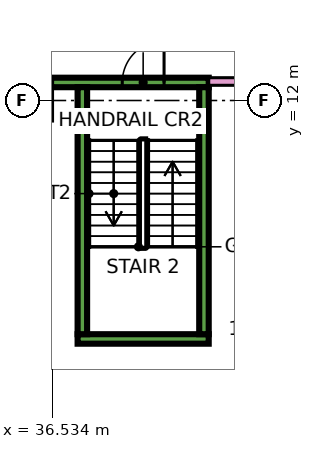
"""IFC4 building model, lengths in metres.
Left out: names, types, materials, properties, quantities, classifications, styles, units other than length and angle.
Written with IfcOpenShell. Run it as: python <this file> out.ifc"""

import sys

from ifc_helpers import new_model, si_unit, direction, frame, frame_2d, origin, place, context, subcontext, project, spatial, rectangle, extrude, element, fill, save


model = new_model("IFC4")
c1 = context("Model", 3, precision=1e-05, world=origin(), true_north=direction((0.0, 1.0)))
c2 = subcontext(c1, "Body", "Model", "MODEL_VIEW")
j1 = project(units=[si_unit("LENGTHUNIT", "METRE"), si_unit("PLANEANGLEUNIT", "RADIAN")], contexts=[c1])
p1 = place(None, origin())
s1 = spatial("IfcSite", under=j1, at=p1, CompositionType="ELEMENT")
p2 = place(p1, origin())
s2 = spatial("IfcBuilding", under=s1, at=p2, CompositionType="ELEMENT")
p3 = place(p2, frame((0.0, 0.0, 118.15)))
s3 = spatial("IfcBuildingStorey", under=s2, at=p3, CompositionType="ELEMENT", Elevation=118.15)
p4 = place(p3, frame((37.2, 5.725, 0.0), z_axis=(0.0, 0.0, 1.0), x_axis=(1.0, 0.0, 0.0)))
e1 = element("IfcWall", 1, at=p4, inside=s3, PredefinedType="SHEAR", context=c2, shape_type="SweptSolid", body=[
    extrude(rectangle(XDim=3.45, YDim=0.25, at=frame_2d((1.725, 0.0))), origin(), (0.0, 0.0, 1.0), 3.75),
])
p5 = place(p3, frame((36.5, 12.475, 0.0), z_axis=(0.0, 0.0, 1.0), x_axis=(1.0, 0.0, 0.0)))
e2 = element("IfcWall", 2, at=p5, inside=s3, PredefinedType="SHEAR", context=c2, shape_type="SweptSolid", body=[
    extrude(rectangle(XDim=4.15, YDim=0.25, at=frame_2d((2.075, 0.0))), origin(), (0.0, 0.0, 1.0), 3.75),
])
p6 = place(p5, frame((1.875, 0.0, 0.0)))
e3 = element("IfcOpeningElement", 3, at=p6, cuts=e2, PredefinedType="OPENING", context=c2, shape_type="SweptSolid", body=[
    extrude(rectangle(XDim=1.1, YDim=2.2, at=frame_2d((0.55, 1.1))), frame((0.0, 0.135, 0.0), z_axis=(0.0, -1.0, 0.0), x_axis=(1.0, 0.0, 0.0)), (0.0, 0.0, 1.0), 0.27),
])
for number, where, z_axis, x_axis in (
    (4, (37.325, 5.85, 0.0), (0.0, 0.0, 1.0), (0.0, 1.0, 0.0)),
    (5, (40.525, 5.85, 0.0), (0.0, 0.0, 1.0), (0.0, 1.0, 0.0)),
):
    element("IfcWall", number, at=place(p3, frame(where, z_axis=z_axis, x_axis=x_axis)), inside=s3, PredefinedType="SHEAR", context=c2, shape_type="SweptSolid", body=[
        extrude(rectangle(XDim=6.5, YDim=0.25, at=frame_2d((3.25, 0.0))), origin(), (0.0, 0.0, 1.0), 3.75),
    ])
p7 = place(p3, frame((40.65, 12.5, 0.0), z_axis=(0.0, 0.0, 1.0), x_axis=(1.0, 0.0, 0.0)))
e6 = element("IfcWall", 6, at=p7, inside=s3, PredefinedType="PARTITIONING", context=c2, shape_type="SweptSolid", body=[
    extrude(rectangle(XDim=31.276, YDim=0.2, at=frame_2d((15.638, 0.0))), origin(), (0.0, 0.0, 1.0), 3.35),
])
p8 = place(p7, frame((20.7, 0.0, 0.0)))
e7 = element("IfcOpeningElement", 7, at=p8, cuts=e6, PredefinedType="OPENING", context=c2, shape_type="SweptSolid", body=[
    extrude(rectangle(XDim=1.0, YDim=2.1, at=frame_2d((0.5, 1.05))), frame((0.0, 0.11, 0.0), z_axis=(0.0, -1.0, 0.0), x_axis=(1.0, 0.0, 0.0)), (0.0, 0.0, 1.0), 0.22),
])
p9 = place(p7, frame((1.05, 0.0, 0.0)))
e8 = element("IfcOpeningElement", 8, at=p9, cuts=e6, PredefinedType="OPENING", context=c2, shape_type="SweptSolid", body=[
    extrude(rectangle(XDim=1.0, YDim=2.1, at=frame_2d((0.5, 1.05))), frame((0.0, 0.11, 0.0), z_axis=(0.0, -1.0, 0.0), x_axis=(1.0, 0.0, 0.0)), (0.0, 0.0, 1.0), 0.22),
])
p10 = place(p6, frame((1.1, 0.0, 0.0), z_axis=(0.0, 0.0, 1.0), x_axis=(-1.0, 0.0, 0.0)))
e9 = element("IfcDoor", 9, at=p10, inside=s3, OperationType="SINGLE_SWING_RIGHT", PredefinedType="DOOR", context=c2, shape_type="SweptSolid", body=[
    extrude(rectangle(XDim=1.1, YDim=2.2, at=frame_2d((0.55, 1.1))), frame((0.0, 0.025, 0.0), z_axis=(0.0, -1.0, 0.0), x_axis=(1.0, 0.0, 0.0)), (0.0, 0.0, 1.0), 0.05),
])
fill(e3, e9)
save(model, sys.argv[1])
